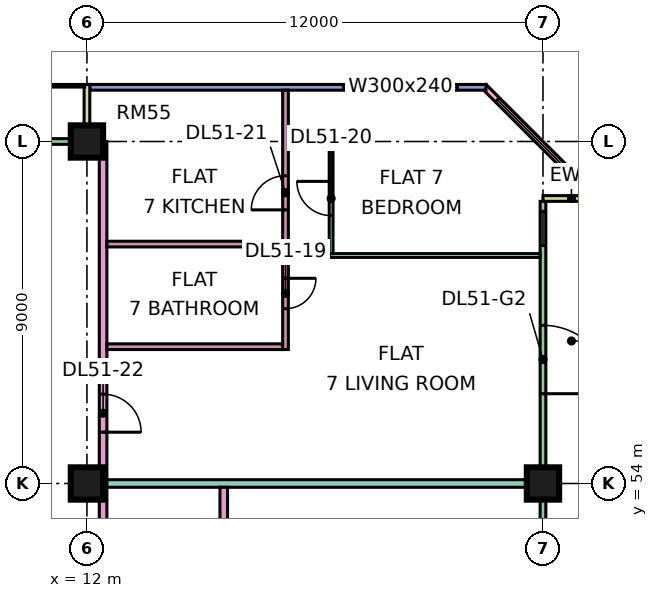
"""IFC4 building model, lengths in metres.
Left out: names, types, materials, properties, quantities, classifications, styles, units other than length and angle.
Written with IfcOpenShell. Run it as: python <this file> out.ifc"""

import sys

from ifc_helpers import new_model, si_unit, direction, frame, frame_2d, origin, origin_2d, place, context, subcontext, project, spatial, rectangle, extrude, element, fill, save


model = new_model("IFC4")
c1 = context("Model", 3, precision=1e-05, world=origin(), true_north=direction((0.0, 1.0)))
c2 = subcontext(c1, "Body", "Model", "MODEL_VIEW")
j1 = project(units=[si_unit("LENGTHUNIT", "METRE"), si_unit("PLANEANGLEUNIT", "RADIAN")], contexts=[c1])
p1 = place(None, origin())
s1 = spatial("IfcSite", under=j1, at=p1, CompositionType="ELEMENT")
p2 = place(p1, origin())
s2 = spatial("IfcBuilding", under=s1, at=p2, CompositionType="ELEMENT")
p3 = place(p2, frame((0.0, 0.0, 219.15)))
s3 = spatial("IfcBuildingStorey", under=s2, at=p3, CompositionType="ELEMENT", Elevation=219.15)
for number, where, z_axis, x_axis in (
    (1, (12.0, 54.0, 0.0), (0.0, 0.0, 1.0), (1.0, 0.0, 0.0)),
    (2, (12.0, 63.0, 0.0), (0.0, 0.0, 1.0), (1.0, 0.0, 0.0)),
    (3, (24.0, 54.0, 0.0), (0.0, 0.0, 1.0), (1.0, 0.0, 0.0)),
):
    element("IfcColumn", number, at=place(p3, frame(where, z_axis=z_axis, x_axis=x_axis)), inside=s3, PredefinedType="COLUMN", context=c2, shape_type="SweptSolid", body=[
        extrude(rectangle(XDim=0.85, YDim=0.85, at=origin_2d()), origin(), (0.0, 0.0, 1.0), 3.75),
    ])
p4 = place(p3, frame((24.0, 48.075, 0.0), z_axis=(0.0, 0.0, 1.0), x_axis=(0.0, 1.0, 0.0)))
e4 = element("IfcWall", 4, at=p4, inside=s3, PredefinedType="SOLIDWALL", context=c2, shape_type="SweptSolid", body=[
    extrude(rectangle(XDim=13.35, YDim=0.15, at=frame_2d((6.675, 0.0))), origin(), (0.0, 0.0, 1.0), 3.35),
])
p5 = place(p4, frame((0.6, 0.0, 0.45)))
e5 = element("IfcOpeningElement", 5, at=p5, cuts=e4, PredefinedType="OPENING", context=c2, shape_type="SweptSolid", body=[
    extrude(rectangle(XDim=4.2, YDim=2.4, at=frame_2d((2.1, 1.2))), frame((0.0, 0.085, 0.0), z_axis=(0.0, -1.0, 0.0), x_axis=(1.0, 0.0, 0.0)), (0.0, 0.0, 1.0), 0.17),
])
p6 = place(p4, frame((8.288, 0.0, 0.0)))
e6 = element("IfcOpeningElement", 6, at=p6, cuts=e4, PredefinedType="OPENING", context=c2, shape_type="SweptSolid", body=[
    extrude(rectangle(XDim=1.8, YDim=2.4, at=frame_2d((0.9, 1.2))), frame((0.0, 0.085, 0.0), z_axis=(0.0, -1.0, 0.0), x_axis=(1.0, 0.0, 0.0)), (0.0, 0.0, 1.0), 0.17),
])
p7 = place(p4, frame((12.188, 0.0, 0.45)))
e7 = element("IfcOpeningElement", 7, at=p7, cuts=e4, PredefinedType="OPENING", context=c2, shape_type="SweptSolid", body=[
    extrude(rectangle(XDim=0.9, YDim=2.4, at=frame_2d((0.45, 1.2))), frame((0.0, 0.085, 0.0), z_axis=(0.0, -1.0, 0.0), x_axis=(1.0, 0.0, 0.0)), (0.0, 0.0, 1.0), 0.17),
])
p8 = place(p3, frame((25.5, 61.5, 0.0), z_axis=(0.0, 0.0, 1.0), x_axis=(-1.0, 0.0, 0.0)))
e8 = element("IfcWall", 8, at=p8, inside=s3, PredefinedType="SOLIDWALL", context=c2, shape_type="SweptSolid", body=[
    extrude(rectangle(XDim=1.5, YDim=0.15, at=frame_2d((0.75, 0.0))), origin(), (0.0, 0.0, 1.0), 3.35),
])
p9 = place(p3, frame((25.447, 61.447, 0.0), z_axis=(0.0, 0.0, 1.0), x_axis=(-0.707106781187, 0.707106781187, 0.0)))
e9 = element("IfcWall", 9, at=p9, inside=s3, PredefinedType="SOLIDWALL", context=c2, shape_type="SweptSolid", body=[
    extrude(rectangle(XDim=4.243, YDim=0.15, at=frame_2d((2.121, 0.0))), origin(), (0.0, 0.0, 1.0), 3.35),
])
p10 = place(p9, frame((0.744, 0.0, 0.45)))
e10 = element("IfcOpeningElement", 10, at=p10, cuts=e9, PredefinedType="OPENING", context=c2, shape_type="SweptSolid", body=[
    extrude(rectangle(XDim=3.0, YDim=2.4, at=frame_2d((1.5, 1.2))), frame((0.0, 0.085, 0.0), z_axis=(0.0, -1.0, 0.0), x_axis=(1.0, 0.0, 0.0)), (0.0, 0.0, 1.0), 0.17),
])
p11 = place(p3, frame((22.5, 64.425, 0.0), z_axis=(0.0, 0.0, 1.0), x_axis=(-1.0, 0.0, 0.0)))
e11 = element("IfcWall", 11, at=p11, inside=s3, PredefinedType="SOLIDWALL", context=c2, shape_type="SweptSolid", body=[
    extrude(rectangle(XDim=10.425, YDim=0.15, at=frame_2d((5.212, 0.0))), origin(), (0.0, 0.0, 1.0), 3.35),
])
p12 = place(p11, frame((0.75, 0.0, 0.45)))
e12 = element("IfcOpeningElement", 12, at=p12, cuts=e11, PredefinedType="OPENING", context=c2, shape_type="SweptSolid", body=[
    extrude(rectangle(XDim=3.0, YDim=2.4, at=frame_2d((1.5, 1.2))), frame((0.0, 0.085, 0.0), z_axis=(0.0, -1.0, 0.0), x_axis=(1.0, 0.0, 0.0)), (0.0, 0.0, 1.0), 0.17),
])
p13 = place(p3, frame((11.925, 63.0, 0.0), z_axis=(0.0, 0.0, 1.0), x_axis=(-1.0, 0.0, 0.0)))
e13 = element("IfcWall", 13, at=p13, inside=s3, PredefinedType="SOLIDWALL", context=c2, shape_type="SweptSolid", body=[
    extrude(rectangle(XDim=10.35, YDim=0.15, at=frame_2d((5.175, 0.0))), origin(), (0.0, 0.0, 1.0), 3.35),
])
p14 = place(p13, frame((2.775, 0.0, 0.45)))
e14 = element("IfcOpeningElement", 14, at=p14, cuts=e13, PredefinedType="OPENING", context=c2, shape_type="SweptSolid", body=[
    extrude(rectangle(XDim=1.8, YDim=2.4, at=frame_2d((0.9, 1.2))), frame((0.0, 0.085, 0.0), z_axis=(0.0, -1.0, 0.0), x_axis=(1.0, 0.0, 0.0)), (0.0, 0.0, 1.0), 0.17),
])
p15 = place(p13, frame((6.788, 0.0, 0.0)))
e15 = element("IfcOpeningElement", 15, at=p15, cuts=e13, PredefinedType="OPENING", context=c2, shape_type="SweptSolid", body=[
    extrude(rectangle(XDim=1.8, YDim=2.4, at=frame_2d((0.9, 1.2))), frame((0.0, 0.085, 0.0), z_axis=(0.0, -1.0, 0.0), x_axis=(1.0, 0.0, 0.0)), (0.0, 0.0, 1.0), 0.17),
])
p16 = place(p3, frame((12.0, 64.5, 0.0), z_axis=(0.0, 0.0, 1.0), x_axis=(0.0, -1.0, 0.0)))
e16 = element("IfcWall", 16, at=p16, inside=s3, PredefinedType="SOLIDWALL", context=c2, shape_type="SweptSolid", body=[
    extrude(rectangle(XDim=1.5, YDim=0.15, at=frame_2d((0.75, 0.0))), origin(), (0.0, 0.0, 1.0), 3.35),
])
p17 = place(p3, frame((12.425, 20.0, 0.0), z_axis=(0.0, 0.0, 1.0), x_axis=(0.0, 1.0, 0.0)))
e17 = element("IfcWall", 17, at=p17, inside=s3, PredefinedType="PARTITIONING", context=c2, shape_type="SweptSolid", body=[
    extrude(rectangle(XDim=43.0, YDim=0.2, at=frame_2d((21.5, 0.0))), origin(), (0.0, 0.0, 1.0), 3.35),
])
p18 = place(p17, frame((7.15, 0.0, 0.0)))
e18 = element("IfcOpeningElement", 18, at=p18, cuts=e17, PredefinedType="OPENING", context=c2, shape_type="SweptSolid", body=[
    extrude(rectangle(XDim=1.6, YDim=2.1, at=frame_2d((0.8, 1.05))), frame((0.0, 0.11, 0.0), z_axis=(0.0, -1.0, 0.0), x_axis=(1.0, 0.0, 0.0)), (0.0, 0.0, 1.0), 0.22),
])
p19 = place(p17, frame((13.5, 0.0, 0.0)))
e19 = element("IfcOpeningElement", 19, at=p19, cuts=e17, PredefinedType="OPENING", context=c2, shape_type="SweptSolid", body=[
    extrude(rectangle(XDim=1.0, YDim=2.1, at=frame_2d((0.5, 1.05))), frame((0.0, 0.11, 0.0), z_axis=(0.0, -1.0, 0.0), x_axis=(1.0, 0.0, 0.0)), (0.0, 0.0, 1.0), 0.22),
])
p20 = place(p17, frame((22.9, 0.0, 0.0)))
e20 = element("IfcOpeningElement", 20, at=p20, cuts=e17, PredefinedType="OPENING", context=c2, shape_type="SweptSolid", body=[
    extrude(rectangle(XDim=1.0, YDim=2.1, at=frame_2d((0.5, 1.05))), frame((0.0, 0.11, 0.0), z_axis=(0.0, -1.0, 0.0), x_axis=(1.0, 0.0, 0.0)), (0.0, 0.0, 1.0), 0.22),
])
p21 = place(p17, frame((35.35, 0.0, 0.0)))
e21 = element("IfcOpeningElement", 21, at=p21, cuts=e17, PredefinedType="OPENING", context=c2, shape_type="SweptSolid", body=[
    extrude(rectangle(XDim=1.0, YDim=2.1, at=frame_2d((0.5, 1.05))), frame((0.0, 0.11, 0.0), z_axis=(0.0, -1.0, 0.0), x_axis=(1.0, 0.0, 0.0)), (0.0, 0.0, 1.0), 0.22),
])
p22 = place(p17, frame((1.15, 0.0, 0.0)))
e22 = element("IfcOpeningElement", 22, at=p22, cuts=e17, PredefinedType="OPENING", context=c2, shape_type="SweptSolid", body=[
    extrude(rectangle(XDim=1.8, YDim=2.1, at=frame_2d((0.9, 1.05))), frame((0.0, 0.11, 0.0), z_axis=(0.0, -1.0, 0.0), x_axis=(1.0, 0.0, 0.0)), (0.0, 0.0, 1.0), 0.22),
])
p23 = place(p17, frame((28.6, 0.0, 0.0)))
e23 = element("IfcOpeningElement", 23, at=p23, cuts=e17, PredefinedType="OPENING", context=c2, shape_type="SweptSolid", body=[
    extrude(rectangle(XDim=1.8, YDim=2.1, at=frame_2d((0.9, 1.05))), frame((0.0, 0.11, 0.0), z_axis=(0.0, -1.0, 0.0), x_axis=(1.0, 0.0, 0.0)), (0.0, 0.0, 1.0), 0.22),
])
p24 = place(p3, frame((12.525, 54.0, 0.0), z_axis=(0.0, 0.0, 1.0), x_axis=(1.0, 0.0, 0.0)))
e24 = element("IfcWall", 24, at=p24, inside=s3, PredefinedType="PARTITIONING", context=c2, shape_type="SweptSolid", body=[
    extrude(rectangle(XDim=11.401, YDim=0.2, at=frame_2d((5.701, 0.0))), origin(), (0.0, 0.0, 1.0), 3.35),
])
for number, where, z_axis, x_axis in (
    (25, (12.525, 57.6, 0.0), (0.0, 0.0, 1.0), (1.0, 0.0, 0.0)),
    (26, (12.525, 60.3, 0.0), (0.0, 0.0, 1.0), (1.0, 0.0, 0.0)),
):
    element("IfcWall", number, at=place(p3, frame(where, z_axis=z_axis, x_axis=x_axis)), inside=s3, PredefinedType="PARTITIONING", context=c2, shape_type="SweptSolid", body=[
        extrude(rectangle(XDim=4.625, YDim=0.15, at=frame_2d((2.312, 0.0))), origin(), (0.0, 0.0, 1.0), 3.35),
    ])
p25 = place(p3, frame((15.6, 51.225, 0.0), z_axis=(0.0, 0.0, 1.0), x_axis=(0.0, 1.0, 0.0)))
e27 = element("IfcWall", 27, at=p25, inside=s3, PredefinedType="PARTITIONING", context=c2, shape_type="SweptSolid", body=[
    extrude(rectangle(XDim=2.675, YDim=0.2, at=frame_2d((1.337, 0.0))), origin(), (0.0, 0.0, 1.0), 3.35),
])
p26 = place(p3, frame((17.225, 57.525, 0.0), z_axis=(0.0, 0.0, 1.0), x_axis=(0.0, 1.0, 0.0)))
e28 = element("IfcWall", 28, at=p26, inside=s3, PredefinedType="PARTITIONING", context=c2, shape_type="SweptSolid", body=[
    extrude(rectangle(XDim=6.825, YDim=0.15, at=frame_2d((3.413, 0.0))), origin(), (0.0, 0.0, 1.0), 3.35),
])
p27 = place(p26, frame((1.075, 0.0, 0.0)))
e29 = element("IfcOpeningElement", 29, at=p27, cuts=e28, PredefinedType="OPENING", context=c2, shape_type="SweptSolid", body=[
    extrude(rectangle(XDim=0.8, YDim=2.1, at=frame_2d((0.4, 1.05))), frame((0.0, 0.085, 0.0), z_axis=(0.0, -1.0, 0.0), x_axis=(1.0, 0.0, 0.0)), (0.0, 0.0, 1.0), 0.17),
])
p28 = place(p26, frame((3.675, 0.0, 0.0)))
e30 = element("IfcOpeningElement", 30, at=p28, cuts=e28, PredefinedType="OPENING", context=c2, shape_type="SweptSolid", body=[
    extrude(rectangle(XDim=0.9, YDim=2.1, at=frame_2d((0.45, 1.05))), frame((0.0, 0.085, 0.0), z_axis=(0.0, -1.0, 0.0), x_axis=(1.0, 0.0, 0.0)), (0.0, 0.0, 1.0), 0.17),
])
p29 = place(p3, frame((18.0, 63.0, 0.0), z_axis=(0.0, 0.0, 1.0), x_axis=(1.0, 0.0, 0.0)))
e31 = element("IfcWall", 31, at=p29, inside=s3, PredefinedType="PARTITIONING", context=c2, shape_type="SweptSolid", body=[
    extrude(rectangle(XDim=0.375, YDim=0.1, at=frame_2d((0.188, 0.0))), origin(), (0.0, 0.0, 1.0), 3.35),
])
p30 = place(p3, frame((18.375, 60.0, 0.0), z_axis=(0.0, 0.0, 1.0), x_axis=(1.0, 0.0, 0.0)))
e32 = element("IfcWall", 32, at=p30, inside=s3, PredefinedType="PARTITIONING", context=c2, shape_type="SweptSolid", body=[
    extrude(rectangle(XDim=5.551, YDim=0.1, at=frame_2d((2.775, 0.0))), origin(), (0.0, 0.0, 1.0), 3.35),
])
p31 = place(p3, frame((18.425, 60.05, 0.0), z_axis=(0.0, 0.0, 1.0), x_axis=(0.0, 1.0, 0.0)))
e33 = element("IfcWall", 33, at=p31, inside=s3, PredefinedType="PARTITIONING", context=c2, shape_type="SweptSolid", body=[
    extrude(rectangle(XDim=3.0, YDim=0.1, at=frame_2d((1.5, 0.0))), origin(), (0.0, 0.0, 1.0), 3.35),
])
p32 = place(p31, frame((1.0, 0.0, 0.0)))
e34 = element("IfcOpeningElement", 34, at=p32, cuts=e33, PredefinedType="OPENING", context=c2, shape_type="SweptSolid", body=[
    extrude(rectangle(XDim=0.9, YDim=2.1, at=frame_2d((0.45, 1.05))), frame((0.0, 0.06, 0.0), z_axis=(0.0, -1.0, 0.0), x_axis=(1.0, 0.0, 0.0)), (0.0, 0.0, 1.0), 0.12),
])
p33 = place(p6, frame((1.8, 0.0, 0.0), z_axis=(0.0, 0.0, 1.0), x_axis=(-1.0, 0.0, 0.0)))
e35 = element("IfcDoor", 35, at=p33, inside=s3, OperationType="DOUBLE_DOOR_SINGLE_SWING", PredefinedType="DOOR", context=c2, shape_type="SweptSolid", body=[
    extrude(rectangle(XDim=1.8, YDim=2.4, at=frame_2d((0.9, 1.2))), frame((0.0, 0.025, 0.0), z_axis=(0.0, -1.0, 0.0), x_axis=(1.0, 0.0, 0.0)), (0.0, 0.0, 1.0), 0.05),
])
fill(e6, e35)
p34 = place(p7, origin())
e36 = element("IfcWindow", 36, at=p34, inside=s3, PartitioningType="SINGLE_PANEL", PredefinedType="WINDOW", context=c2, shape_type="SweptSolid", body=[
    extrude(rectangle(XDim=0.9, YDim=2.4, at=frame_2d((0.45, 1.2))), frame((0.0, 0.03, 0.0), z_axis=(0.0, -1.0, 0.0), x_axis=(1.0, 0.0, 0.0)), (0.0, 0.0, 1.0), 0.06),
])
fill(e7, e36)
p35 = place(p10, origin())
e37 = element("IfcWindow", 37, at=p35, inside=s3, PartitioningType="SINGLE_PANEL", PredefinedType="WINDOW", context=c2, shape_type="SweptSolid", body=[
    extrude(rectangle(XDim=3.0, YDim=2.4, at=frame_2d((1.5, 1.2))), frame((0.0, 0.03, 0.0), z_axis=(0.0, -1.0, 0.0), x_axis=(1.0, 0.0, 0.0)), (0.0, 0.0, 1.0), 0.06),
])
fill(e10, e37)
p36 = place(p12, origin())
e38 = element("IfcWindow", 38, at=p36, inside=s3, PartitioningType="SINGLE_PANEL", PredefinedType="WINDOW", context=c2, shape_type="SweptSolid", body=[
    extrude(rectangle(XDim=3.0, YDim=2.4, at=frame_2d((1.5, 1.2))), frame((0.0, 0.03, 0.0), z_axis=(0.0, -1.0, 0.0), x_axis=(1.0, 0.0, 0.0)), (0.0, 0.0, 1.0), 0.06),
])
fill(e12, e38)
p37 = place(p27, origin())
e39 = element("IfcDoor", 39, at=p37, inside=s3, OperationType="SINGLE_SWING_RIGHT", PredefinedType="DOOR", context=c2, shape_type="SweptSolid", body=[
    extrude(rectangle(XDim=0.8, YDim=2.1, at=frame_2d((0.4, 1.05))), frame((0.0, 0.025, 0.0), z_axis=(0.0, -1.0, 0.0), x_axis=(1.0, 0.0, 0.0)), (0.0, 0.0, 1.0), 0.05),
])
fill(e29, e39)
p38 = place(p32, frame((0.9, 0.0, 0.0), z_axis=(0.0, 0.0, 1.0), x_axis=(-1.0, 0.0, 0.0)))
e40 = element("IfcDoor", 40, at=p38, inside=s3, OperationType="SINGLE_SWING_RIGHT", PredefinedType="DOOR", context=c2, shape_type="SweptSolid", body=[
    extrude(rectangle(XDim=0.9, YDim=2.1, at=frame_2d((0.45, 1.05))), frame((0.0, 0.025, 0.0), z_axis=(0.0, -1.0, 0.0), x_axis=(1.0, 0.0, 0.0)), (0.0, 0.0, 1.0), 0.05),
])
fill(e34, e40)
p39 = place(p28, origin())
e41 = element("IfcDoor", 41, at=p39, inside=s3, OperationType="SINGLE_SWING_LEFT", PredefinedType="DOOR", context=c2, shape_type="SweptSolid", body=[
    extrude(rectangle(XDim=0.9, YDim=2.1, at=frame_2d((0.45, 1.05))), frame((0.0, 0.025, 0.0), z_axis=(0.0, -1.0, 0.0), x_axis=(1.0, 0.0, 0.0)), (0.0, 0.0, 1.0), 0.05),
])
fill(e30, e41)
p40 = place(p21, frame((1.0, 0.0, 0.0), z_axis=(0.0, 0.0, 1.0), x_axis=(-1.0, 0.0, 0.0)))
e42 = element("IfcDoor", 42, at=p40, inside=s3, OperationType="SINGLE_SWING_LEFT", PredefinedType="DOOR", context=c2, shape_type="SweptSolid", body=[
    extrude(rectangle(XDim=1.0, YDim=2.1, at=frame_2d((0.5, 1.05))), frame((0.0, 0.025, 0.0), z_axis=(0.0, -1.0, 0.0), x_axis=(1.0, 0.0, 0.0)), (0.0, 0.0, 1.0), 0.05),
])
fill(e21, e42)
save(model, sys.argv[1])
